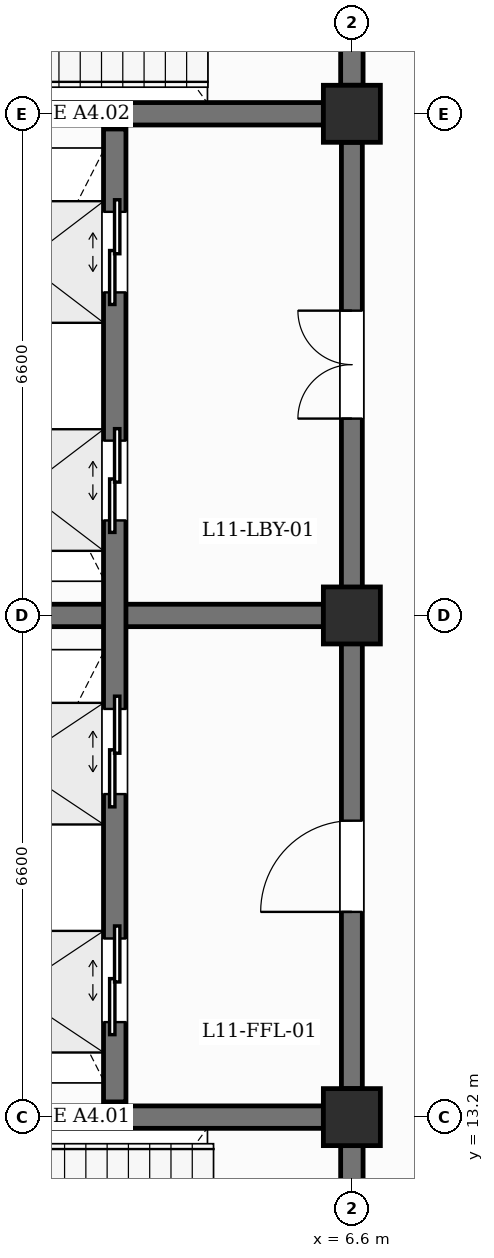
"""IFC4 building model, lengths in metres.
Left out: names, types, materials, properties, quantities, classifications, styles, units other than length and angle.
Written with IfcOpenShell. Run it as: python <this file> out.ifc"""

import sys

from ifc_helpers import new_model, si_unit, direction, frame, frame_2d, origin, origin_2d, place, context, subcontext, project, spatial, rectangle, extrude, element, fill, save


model = new_model("IFC4")
c1 = context("Model", 3, precision=1e-05, world=origin(), true_north=direction((0.0, 1.0)))
c2 = subcontext(c1, "Body", "Model", "MODEL_VIEW")
j1 = project(units=[si_unit("LENGTHUNIT", "METRE"), si_unit("PLANEANGLEUNIT", "RADIAN")], contexts=[c1])
p1 = place(None, origin())
s1 = spatial("IfcSite", under=j1, at=p1, CompositionType="ELEMENT")
p2 = place(p1, origin())
s2 = spatial("IfcBuilding", under=s1, at=p2, CompositionType="ELEMENT")
p3 = place(p2, frame((0.0, 0.0, 48.0)))
s3 = spatial("IfcBuildingStorey", under=s2, at=p3, CompositionType="ELEMENT", Elevation=48.0)
for number, where, z_axis, x_axis in (
    (1, (6.6, 13.2, 0.0), (0.0, 0.0, 1.0), (1.0, 0.0, 0.0)),
    (2, (6.6, 19.8, 0.0), (0.0, 0.0, 1.0), (1.0, 0.0, 0.0)),
    (3, (6.6, 26.4, 0.0), (0.0, 0.0, 1.0), (1.0, 0.0, 0.0)),
):
    element("IfcColumn", number, at=place(p3, frame(where, z_axis=z_axis, x_axis=x_axis)), inside=s3, PredefinedType="COLUMN", context=c2, shape_type="SweptSolid", body=[
        extrude(rectangle(XDim=0.75, YDim=0.75, at=origin_2d()), origin(), (0.0, 0.0, 1.0), 4.2),
    ])
p4 = place(p3, frame((0.375, 13.2, 0.0), z_axis=(0.0, 0.0, 1.0), x_axis=(1.0, 0.0, 0.0)))
e4 = element("IfcWall", 4, at=p4, inside=s3, PredefinedType="SHEAR", context=c2, shape_type="SweptSolid", body=[
    extrude(rectangle(XDim=5.85, YDim=0.295, at=frame_2d((2.925, 0.0))), origin(), (0.0, 0.0, 1.0), 3.29),
])
p5 = place(p3, frame((6.6, 6.975, 0.0), z_axis=(0.0, 0.0, 1.0), x_axis=(0.0, 1.0, 0.0)))
e5 = element("IfcWall", 5, at=p5, inside=s3, PredefinedType="SHEAR", context=c2, shape_type="SweptSolid", body=[
    extrude(rectangle(XDim=5.85, YDim=0.295, at=frame_2d((2.925, 0.0))), origin(), (0.0, 0.0, 1.0), 3.29),
])
p6 = place(p5, frame((2.375, 0.0, 0.0)))
e6 = element("IfcOpeningElement", 6, at=p6, cuts=e5, PredefinedType="OPENING", context=c2, shape_type="SweptSolid", body=[
    extrude(rectangle(XDim=1.1, YDim=2.15, at=frame_2d((0.55, 1.075))), frame((0.0, 0.157, 0.0), z_axis=(0.0, -1.0, 0.0), x_axis=(1.0, 0.0, 0.0)), (0.0, 0.0, 1.0), 0.315),
])
p7 = place(p3, frame((0.375, 26.4, 0.0), z_axis=(0.0, 0.0, 1.0), x_axis=(1.0, 0.0, 0.0)))
e7 = element("IfcWall", 7, at=p7, inside=s3, PredefinedType="SHEAR", context=c2, shape_type="SweptSolid", body=[
    extrude(rectangle(XDim=5.85, YDim=0.295, at=frame_2d((2.925, 0.0))), origin(), (0.0, 0.0, 1.0), 3.29),
])
p8 = place(p3, frame((6.6, 26.775, 0.0), z_axis=(0.0, 0.0, 1.0), x_axis=(0.0, 1.0, 0.0)))
e8 = element("IfcWall", 8, at=p8, inside=s3, PredefinedType="SHEAR", context=c2, shape_type="SweptSolid", body=[
    extrude(rectangle(XDim=5.875, YDim=0.295, at=frame_2d((2.938, 0.0))), origin(), (0.0, 0.0, 1.0), 3.29),
])
p9 = place(p8, frame((2.387, 0.0, 0.0)))
e9 = element("IfcOpeningElement", 9, at=p9, cuts=e8, PredefinedType="OPENING", context=c2, shape_type="SweptSolid", body=[
    extrude(rectangle(XDim=1.1, YDim=2.15, at=frame_2d((0.55, 1.075))), frame((0.0, 0.157, 0.0), z_axis=(0.0, -1.0, 0.0), x_axis=(1.0, 0.0, 0.0)), (0.0, 0.0, 1.0), 0.315),
])
p10 = place(p3, frame((0.375, 19.8, 0.0), z_axis=(0.0, 0.0, 1.0), x_axis=(1.0, 0.0, 0.0)))
e10 = element("IfcWall", 10, at=p10, inside=s3, PredefinedType="SHEAR", context=c2, shape_type="SweptSolid", body=[
    extrude(rectangle(XDim=5.85, YDim=0.295, at=frame_2d((2.925, 0.0))), origin(), (0.0, 0.0, 1.0), 3.29),
])
p11 = place(p3, frame((6.6, 13.575, 0.0), z_axis=(0.0, 0.0, 1.0), x_axis=(0.0, 1.0, 0.0)))
e11 = element("IfcWall", 11, at=p11, inside=s3, PredefinedType="SHEAR", context=c2, shape_type="SweptSolid", body=[
    extrude(rectangle(XDim=5.85, YDim=0.275, at=frame_2d((2.925, 0.0))), origin(), (0.0, 0.0, 1.0), 3.29),
])
p12 = place(p11, frame((2.325, 0.0, 0.0)))
e12 = element("IfcOpeningElement", 12, at=p12, cuts=e11, PredefinedType="OPENING", context=c2, shape_type="SweptSolid", body=[
    extrude(rectangle(XDim=1.2, YDim=2.25, at=frame_2d((0.6, 1.125))), frame((0.0, 0.147, 0.0), z_axis=(0.0, -1.0, 0.0), x_axis=(1.0, 0.0, 0.0)), (0.0, 0.0, 1.0), 0.295),
])
p13 = place(p3, frame((6.6, 20.175, 0.0), z_axis=(0.0, 0.0, 1.0), x_axis=(0.0, 1.0, 0.0)))
e13 = element("IfcWall", 13, at=p13, inside=s3, PredefinedType="SHEAR", context=c2, shape_type="SweptSolid", body=[
    extrude(rectangle(XDim=5.85, YDim=0.275, at=frame_2d((2.925, 0.0))), origin(), (0.0, 0.0, 1.0), 3.29),
])
p14 = place(p13, frame((2.215, 0.0, 0.0)))
e14 = element("IfcOpeningElement", 14, at=p14, cuts=e13, PredefinedType="OPENING", context=c2, shape_type="SweptSolid", body=[
    extrude(rectangle(XDim=1.42, YDim=2.2, at=frame_2d((0.71, 1.1))), frame((0.0, 0.147, 0.0), z_axis=(0.0, -1.0, 0.0), x_axis=(1.0, 0.0, 0.0)), (0.0, 0.0, 1.0), 0.295),
])
p15 = place(p3, frame((3.48, 13.4, 0.0), z_axis=(0.0, 0.0, 1.0), x_axis=(0.0, 1.0, 0.0)))
e15 = element("IfcWall", 15, at=p15, inside=s3, PredefinedType="SHEAR", context=c2, shape_type="SweptSolid", body=[
    extrude(rectangle(XDim=6.2, YDim=0.295, at=frame_2d((3.1, 0.0))), origin(), (0.0, 0.0, 1.0), 3.89),
])
p16 = place(p15, frame((1.05, 0.0, 0.0)))
e16 = element("IfcOpeningElement", 16, at=p16, cuts=e15, PredefinedType="OPENING", context=c2, shape_type="SweptSolid", body=[
    extrude(rectangle(XDim=1.1, YDim=2.15, at=frame_2d((0.55, 1.075))), frame((0.0, 0.157, 0.0), z_axis=(0.0, -1.0, 0.0), x_axis=(1.0, 0.0, 0.0)), (0.0, 0.0, 1.0), 0.315),
])
p17 = place(p15, frame((4.05, 0.0, 0.0)))
e17 = element("IfcOpeningElement", 17, at=p17, cuts=e15, PredefinedType="OPENING", context=c2, shape_type="SweptSolid", body=[
    extrude(rectangle(XDim=1.12, YDim=2.15, at=frame_2d((0.56, 1.075))), frame((0.0, 0.157, 0.0), z_axis=(0.0, -1.0, 0.0), x_axis=(1.0, 0.0, 0.0)), (0.0, 0.0, 1.0), 0.315),
])
p18 = place(p3, frame((3.48, 20.0, 0.0), z_axis=(0.0, 0.0, 1.0), x_axis=(0.0, 1.0, 0.0)))
e18 = element("IfcWall", 18, at=p18, inside=s3, PredefinedType="SHEAR", context=c2, shape_type="SweptSolid", body=[
    extrude(rectangle(XDim=6.2, YDim=0.295, at=frame_2d((3.1, 0.0))), origin(), (0.0, 0.0, 1.0), 3.89),
])
p19 = place(p18, frame((1.05, 0.0, 0.0)))
e19 = element("IfcOpeningElement", 19, at=p19, cuts=e18, PredefinedType="OPENING", context=c2, shape_type="SweptSolid", body=[
    extrude(rectangle(XDim=1.05, YDim=2.15, at=frame_2d((0.525, 1.075))), frame((0.0, 0.157, 0.0), z_axis=(0.0, -1.0, 0.0), x_axis=(1.0, 0.0, 0.0)), (0.0, 0.0, 1.0), 0.315),
])
p20 = place(p18, frame((4.05, 0.0, 0.0)))
e20 = element("IfcOpeningElement", 20, at=p20, cuts=e18, PredefinedType="OPENING", context=c2, shape_type="SweptSolid", body=[
    extrude(rectangle(XDim=1.06, YDim=2.15, at=frame_2d((0.53, 1.075))), frame((0.0, 0.157, 0.0), z_axis=(0.0, -1.0, 0.0), x_axis=(1.0, 0.0, 0.0)), (0.0, 0.0, 1.0), 0.315),
])
p21 = place(p16, origin())
e21 = element("IfcDoor", 21, at=p21, inside=s3, OperationType="DOUBLE_DOOR_SLIDING", PredefinedType="USERDEFINED", context=c2, shape_type="SweptSolid", body=[
    extrude(rectangle(XDim=1.1, YDim=2.15, at=frame_2d((0.55, 1.075))), frame((0.0, 0.025, 0.0), z_axis=(0.0, -1.0, 0.0), x_axis=(1.0, 0.0, 0.0)), (0.0, 0.0, 1.0), 0.05),
])
fill(e16, e21)
p22 = place(p17, origin())
e22 = element("IfcDoor", 22, at=p22, inside=s3, OperationType="DOUBLE_DOOR_SLIDING", PredefinedType="USERDEFINED", context=c2, shape_type="SweptSolid", body=[
    extrude(rectangle(XDim=1.12, YDim=2.15, at=frame_2d((0.56, 1.075))), frame((0.0, 0.025, 0.0), z_axis=(0.0, -1.0, 0.0), x_axis=(1.0, 0.0, 0.0)), (0.0, 0.0, 1.0), 0.05),
])
fill(e17, e22)
p23 = place(p19, origin())
e23 = element("IfcDoor", 23, at=p23, inside=s3, OperationType="DOUBLE_DOOR_SLIDING", PredefinedType="USERDEFINED", context=c2, shape_type="SweptSolid", body=[
    extrude(rectangle(XDim=1.05, YDim=2.15, at=frame_2d((0.525, 1.075))), frame((0.0, 0.025, 0.0), z_axis=(0.0, -1.0, 0.0), x_axis=(1.0, 0.0, 0.0)), (0.0, 0.0, 1.0), 0.05),
])
fill(e19, e23)
p24 = place(p20, origin())
e24 = element("IfcDoor", 24, at=p24, inside=s3, OperationType="DOUBLE_DOOR_SLIDING", PredefinedType="USERDEFINED", context=c2, shape_type="SweptSolid", body=[
    extrude(rectangle(XDim=1.06, YDim=2.15, at=frame_2d((0.53, 1.075))), frame((0.0, 0.025, 0.0), z_axis=(0.0, -1.0, 0.0), x_axis=(1.0, 0.0, 0.0)), (0.0, 0.0, 1.0), 0.05),
])
fill(e20, e24)
p25 = place(p12, origin())
e25 = element("IfcDoor", 25, at=p25, inside=s3, OperationType="SINGLE_SWING_LEFT", PredefinedType="DOOR", context=c2, shape_type="SweptSolid", body=[
    extrude(rectangle(XDim=1.2, YDim=2.25, at=frame_2d((0.6, 1.125))), frame((0.0, 0.025, 0.0), z_axis=(0.0, -1.0, 0.0), x_axis=(1.0, 0.0, 0.0)), (0.0, 0.0, 1.0), 0.05),
])
fill(e12, e25)
p26 = place(p14, origin())
e26 = element("IfcDoor", 26, at=p26, inside=s3, OperationType="DOUBLE_DOOR_SINGLE_SWING", PredefinedType="DOOR", context=c2, shape_type="SweptSolid", body=[
    extrude(rectangle(XDim=1.42, YDim=2.2, at=frame_2d((0.71, 1.1))), frame((0.0, 0.025, 0.0), z_axis=(0.0, -1.0, 0.0), x_axis=(1.0, 0.0, 0.0)), (0.0, 0.0, 1.0), 0.05),
])
fill(e14, e26)
save(model, sys.argv[1])
